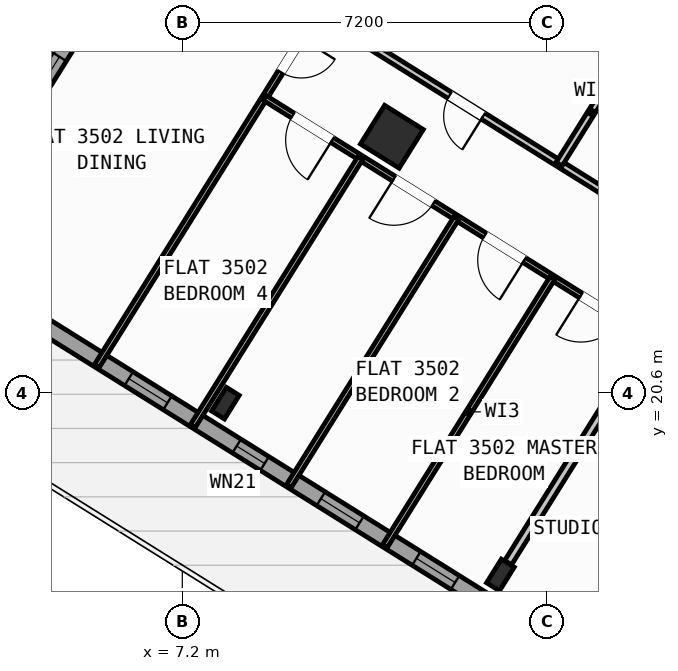
"""IFC4 building model, lengths in metres.
Left out: names, types, materials, properties, quantities, classifications, styles, units other than length and angle.
Written with IfcOpenShell. Run it as: python <this file> out.ifc"""

import sys

from ifc_helpers import new_model, si_unit, direction, frame, frame_2d, origin, origin_2d, place, context, subcontext, project, spatial, rectangle, hollow_rectangle, i_section, extrude, source, transform, mapped, element, fill, save


model = new_model("IFC4")
c1 = context("Model", 3, precision=1e-05, world=origin(), true_north=direction((0.0, 1.0)))
c2 = subcontext(c1, "Body", "Model", "MODEL_VIEW")
j1 = project(units=[si_unit("LENGTHUNIT", "METRE"), si_unit("PLANEANGLEUNIT", "RADIAN")], contexts=[c1])
p1 = place(None, origin())
s1 = spatial("IfcSite", under=j1, at=p1, CompositionType="ELEMENT")
p2 = place(p1, origin())
s2 = spatial("IfcBuilding", under=s1, at=p2, CompositionType="ELEMENT")
p3 = place(p2, frame((0.0, 0.0, 140.7)))
s3 = spatial("IfcBuildingStorey", under=s2, at=p3, CompositionType="ELEMENT", Elevation=140.7)
m1 = source(origin(), c2, "Body", "SweptSolid", [
    extrude(i_section(OverallWidth=0.3, OverallDepth=0.55, WebThickness=0.015, FlangeThickness=0.029, at=origin_2d()), origin(), (0.0, 0.0, 1.0), 3.6),
])
p4 = place(p3, frame((13.478, 17.003, 0.0), z_axis=(0.0, 0.0, 1.0), x_axis=(-0.848048096156, 0.529919264233, 0.0)))
e1 = element("IfcColumn", 1, at=p4, inside=s3, PredefinedType="COLUMN", context=c2, shape_type="MappedRepresentation", body=[
    mapped(m1, transform((0.0, 0.0, 0.0), scale=1.0)),
])
m2 = source(origin(), c2, "Body", "SweptSolid", [
    extrude(hollow_rectangle(XDim=0.9, YDim=0.9, WallThickness=0.036, at=origin_2d()), origin(), (0.0, 0.0, 1.0), 3.6),
])
p5 = place(p3, frame((11.336, 25.653, 0.0), z_axis=(0.0, 0.0, 1.0), x_axis=(-0.848048096156, 0.529919264233, 0.0)))
e2 = element("IfcColumn", 2, at=p5, inside=s3, PredefinedType="COLUMN", context=c2, shape_type="MappedRepresentation", body=[
    mapped(m2, transform((0.0, 0.0, 0.0), scale=1.0)),
])
p6 = place(p3, frame((8.051, 20.395, 0.0), z_axis=(0.0, 0.0, 1.0), x_axis=(-0.848048096156, 0.529919264233, 0.0)))
e3 = element("IfcColumn", 3, at=p6, inside=s3, PredefinedType="COLUMN", context=c2, shape_type="MappedRepresentation", body=[
    mapped(m1, transform((0.0, 0.0, 0.0), scale=1.0)),
])
p7 = place(p3, frame((29.268, 6.429, 0.0), z_axis=(0.0, 0.0, 1.0), x_axis=(-0.848049971435, 0.529916263149, 0.0)))
e4 = element("IfcWall", 4, at=p7, inside=s3, PredefinedType="STANDARD", context=c2, shape_type="SweptSolid", body=[
    extrude(rectangle(XDim=31.588, YDim=0.32, at=frame_2d((15.794, 0.0))), origin(), (0.0, 0.0, 1.0), 3.35),
])
p8 = place(p7, frame((16.362, 0.0, 0.0)))
e5 = element("IfcOpeningElement", 5, at=p8, cuts=e4, PredefinedType="OPENING", context=c2, shape_type="SweptSolid", body=[
    extrude(rectangle(XDim=1.2, YDim=2.15, at=frame_2d((0.6, 1.075))), frame((0.0, 0.17, 0.0), z_axis=(0.0, -1.0, 0.0), x_axis=(1.0, 0.0, 0.0)), (0.0, 0.0, 1.0), 0.34),
])
p9 = place(p7, frame((2.989, 0.0, 0.8)))
e6 = element("IfcOpeningElement", 6, at=p9, cuts=e4, PredefinedType="OPENING", context=c2, shape_type="SweptSolid", body=[
    extrude(rectangle(XDim=2.1, YDim=1.55, at=frame_2d((1.05, 0.775))), frame((0.0, 0.17, 0.0), z_axis=(0.0, -1.0, 0.0), x_axis=(1.0, 0.0, 0.0)), (0.0, 0.0, 1.0), 0.34),
])
p10 = place(p7, frame((8.359, 0.0, 0.8)))
e7 = element("IfcOpeningElement", 7, at=p10, cuts=e4, PredefinedType="OPENING", context=c2, shape_type="SweptSolid", body=[
    extrude(rectangle(XDim=2.1, YDim=1.55, at=frame_2d((1.05, 0.775))), frame((0.0, 0.17, 0.0), z_axis=(0.0, -1.0, 0.0), x_axis=(1.0, 0.0, 0.0)), (0.0, 0.0, 1.0), 0.34),
])
p11 = place(p7, frame((13.284, 0.0, 0.95)))
e8 = element("IfcOpeningElement", 8, at=p11, cuts=e4, PredefinedType="OPENING", context=c2, shape_type="SweptSolid", body=[
    extrude(rectangle(XDim=1.2, YDim=1.4, at=frame_2d((0.6, 0.7))), frame((0.0, 0.17, 0.0), z_axis=(0.0, -1.0, 0.0), x_axis=(1.0, 0.0, 0.0)), (0.0, 0.0, 1.0), 0.34),
])
p12 = place(p7, frame((29.188, 0.0, 0.95)))
e9 = element("IfcOpeningElement", 9, at=p12, cuts=e4, PredefinedType="OPENING", context=c2, shape_type="SweptSolid", body=[
    extrude(rectangle(XDim=1.2, YDim=1.4, at=frame_2d((0.6, 0.7))), frame((0.0, 0.17, 0.0), z_axis=(0.0, -1.0, 0.0), x_axis=(1.0, 0.0, 0.0)), (0.0, 0.0, 1.0), 0.34),
])
p13 = place(p7, frame((19.674, 0.0, 1.0)))
e10 = element("IfcOpeningElement", 10, at=p13, cuts=e4, PredefinedType="OPENING", context=c2, shape_type="SweptSolid", body=[
    extrude(rectangle(XDim=0.9, YDim=1.25, at=frame_2d((0.45, 0.625))), frame((0.0, 0.17, 0.0), z_axis=(0.0, -1.0, 0.0), x_axis=(1.0, 0.0, 0.0)), (0.0, 0.0, 1.0), 0.34),
])
p14 = place(p7, frame((21.896, 0.0, 1.0)))
e11 = element("IfcOpeningElement", 11, at=p14, cuts=e4, PredefinedType="OPENING", context=c2, shape_type="SweptSolid", body=[
    extrude(rectangle(XDim=0.9, YDim=1.25, at=frame_2d((0.45, 0.625))), frame((0.0, 0.17, 0.0), z_axis=(0.0, -1.0, 0.0), x_axis=(1.0, 0.0, 0.0)), (0.0, 0.0, 1.0), 0.34),
])
p15 = place(p7, frame((24.106, 0.0, 1.0)))
e12 = element("IfcOpeningElement", 12, at=p15, cuts=e4, PredefinedType="OPENING", context=c2, shape_type="SweptSolid", body=[
    extrude(rectangle(XDim=0.65, YDim=1.15, at=frame_2d((0.325, 0.575))), frame((0.0, 0.17, 0.0), z_axis=(0.0, -1.0, 0.0), x_axis=(1.0, 0.0, 0.0)), (0.0, 0.0, 1.0), 0.34),
])
p16 = place(p7, frame((26.366, 0.0, 1.0)))
e13 = element("IfcOpeningElement", 13, at=p16, cuts=e4, PredefinedType="OPENING", context=c2, shape_type="SweptSolid", body=[
    extrude(rectangle(XDim=0.9, YDim=1.25, at=frame_2d((0.45, 0.625))), frame((0.0, 0.17, 0.0), z_axis=(0.0, -1.0, 0.0), x_axis=(1.0, 0.0, 0.0)), (0.0, 0.0, 1.0), 0.34),
])
p17 = place(p3, frame((2.415, 23.452, 0.0), z_axis=(0.0, 0.0, 1.0), x_axis=(0.52991049553, 0.848053575387, 0.0)))
e14 = element("IfcWall", 14, at=p17, inside=s3, PredefinedType="STANDARD", context=c2, shape_type="SweptSolid", body=[
    extrude(rectangle(XDim=21.587, YDim=0.32, at=frame_2d((10.794, 0.0))), origin(), (0.0, 0.0, 1.0), 2.775),
])
p18 = place(p17, frame((2.356, 0.0, 0.8)))
e15 = element("IfcOpeningElement", 15, at=p18, cuts=e14, PredefinedType="OPENING", context=c2, shape_type="SweptSolid", body=[
    extrude(rectangle(XDim=2.1, YDim=1.55, at=frame_2d((1.05, 0.775))), frame((0.0, 0.17, 0.0), z_axis=(0.0, -1.0, 0.0), x_axis=(1.0, 0.0, 0.0)), (0.0, 0.0, 1.0), 0.34),
])
p19 = place(p17, frame((8.639, 0.0, 1.0)))
e16 = element("IfcOpeningElement", 16, at=p19, cuts=e14, PredefinedType="OPENING", context=c2, shape_type="SweptSolid", body=[
    extrude(rectangle(XDim=0.9, YDim=1.25, at=frame_2d((0.45, 0.625))), frame((0.0, 0.17, 0.0), z_axis=(0.0, -1.0, 0.0), x_axis=(1.0, 0.0, 0.0)), (0.0, 0.0, 1.0), 0.34),
])
p20 = place(p17, frame((17.744, 0.0, 0.85)))
e17 = element("IfcOpeningElement", 17, at=p20, cuts=e14, PredefinedType="OPENING", context=c2, shape_type="SweptSolid", body=[
    extrude(rectangle(XDim=1.5, YDim=1.5, at=frame_2d((0.75, 0.75))), frame((0.0, 0.17, 0.0), z_axis=(0.0, -1.0, 0.0), x_axis=(1.0, 0.0, 0.0)), (0.0, 0.0, 1.0), 0.34),
])
p21 = place(p3, frame((14.138, 41.825, 0.0), z_axis=(0.0, 0.0, 1.0), x_axis=(0.848046498049, -0.529921821731, 0.0)))
e18 = element("IfcWall", 18, at=p21, inside=s3, PredefinedType="STANDARD", context=c2, shape_type="SweptSolid", body=[
    extrude(rectangle(XDim=31.588, YDim=0.32, at=frame_2d((15.794, 0.0))), origin(), (0.0, 0.0, 1.0), 3.35),
])
p22 = place(p21, frame((2.949, 0.0, 0.0)))
e19 = element("IfcOpeningElement", 19, at=p22, cuts=e18, PredefinedType="OPENING", context=c2, shape_type="SweptSolid", body=[
    extrude(rectangle(XDim=1.05, YDim=2.15, at=frame_2d((0.525, 1.075))), frame((0.0, 0.17, 0.0), z_axis=(0.0, -1.0, 0.0), x_axis=(1.0, 0.0, 0.0)), (0.0, 0.0, 1.0), 0.34),
])
p23 = place(p21, frame((0.861, 0.0, 0.85)))
e20 = element("IfcOpeningElement", 20, at=p23, cuts=e18, PredefinedType="OPENING", context=c2, shape_type="SweptSolid", body=[
    extrude(rectangle(XDim=1.5, YDim=1.5, at=frame_2d((0.75, 0.75))), frame((0.0, 0.17, 0.0), z_axis=(0.0, -1.0, 0.0), x_axis=(1.0, 0.0, 0.0)), (0.0, 0.0, 1.0), 0.34),
])
p24 = place(p21, frame((8.494, 0.0, 0.85)))
e21 = element("IfcOpeningElement", 21, at=p24, cuts=e18, PredefinedType="OPENING", context=c2, shape_type="SweptSolid", body=[
    extrude(rectangle(XDim=1.8, YDim=1.5, at=frame_2d((0.9, 0.75))), frame((0.0, 0.17, 0.0), z_axis=(0.0, -1.0, 0.0), x_axis=(1.0, 0.0, 0.0)), (0.0, 0.0, 1.0), 0.34),
])
p25 = place(p21, frame((13.874, 0.0, 0.85)))
e22 = element("IfcOpeningElement", 22, at=p25, cuts=e18, PredefinedType="OPENING", context=c2, shape_type="SweptSolid", body=[
    extrude(rectangle(XDim=1.5, YDim=1.5, at=frame_2d((0.75, 0.75))), frame((0.0, 0.17, 0.0), z_axis=(0.0, -1.0, 0.0), x_axis=(1.0, 0.0, 0.0)), (0.0, 0.0, 1.0), 0.34),
])
p26 = place(p21, frame((17.104, 0.0, 1.0)))
e23 = element("IfcOpeningElement", 23, at=p26, cuts=e18, PredefinedType="OPENING", context=c2, shape_type="SweptSolid", body=[
    extrude(rectangle(XDim=0.9, YDim=1.25, at=frame_2d((0.45, 0.625))), frame((0.0, 0.17, 0.0), z_axis=(0.0, -1.0, 0.0), x_axis=(1.0, 0.0, 0.0)), (0.0, 0.0, 1.0), 0.34),
])
p27 = place(p21, frame((22.144, 0.0, 1.0)))
e24 = element("IfcOpeningElement", 24, at=p27, cuts=e18, PredefinedType="OPENING", context=c2, shape_type="SweptSolid", body=[
    extrude(rectangle(XDim=0.9, YDim=1.25, at=frame_2d((0.45, 0.625))), frame((0.0, 0.17, 0.0), z_axis=(0.0, -1.0, 0.0), x_axis=(1.0, 0.0, 0.0)), (0.0, 0.0, 1.0), 0.34),
])
p28 = place(p21, frame((27.744, 0.0, 1.0)))
e25 = element("IfcOpeningElement", 25, at=p28, cuts=e18, PredefinedType="OPENING", context=c2, shape_type="SweptSolid", body=[
    extrude(rectangle(XDim=0.9, YDim=1.25, at=frame_2d((0.45, 0.625))), frame((0.0, 0.17, 0.0), z_axis=(0.0, -1.0, 0.0), x_axis=(1.0, 0.0, 0.0)), (0.0, 0.0, 1.0), 0.34),
])
p29 = place(p3, frame((23.104, 25.256, 0.0), z_axis=(0.0, 0.0, 1.0), x_axis=(-0.848041752158, 0.529929416617, 0.0)))
e26 = element("IfcWall", 26, at=p29, inside=s3, PredefinedType="PARTITIONING", context=c2, shape_type="SweptSolid", body=[
    extrude(rectangle(XDim=16.73, YDim=0.16, at=frame_2d((8.365, 0.0))), origin(), (0.0, 0.0, 1.0), 3.34),
])
p30 = place(p29, frame((2.22, 0.0, 0.0)))
e27 = element("IfcOpeningElement", 27, at=p30, cuts=e26, PredefinedType="OPENING", context=c2, shape_type="SweptSolid", body=[
    extrude(rectangle(XDim=0.86, YDim=2.05, at=frame_2d((0.43, 1.025))), frame((0.0, 0.09, 0.0), z_axis=(0.0, -1.0, 0.0), x_axis=(1.0, 0.0, 0.0)), (0.0, 0.0, 1.0), 0.18),
])
p31 = place(p29, frame((12.084, 0.0, 0.0)))
e28 = element("IfcOpeningElement", 28, at=p31, cuts=e26, PredefinedType="OPENING", context=c2, shape_type="SweptSolid", body=[
    extrude(rectangle(XDim=1.0, YDim=2.1, at=frame_2d((0.5, 1.05))), frame((0.0, 0.09, 0.0), z_axis=(0.0, -1.0, 0.0), x_axis=(1.0, 0.0, 0.0)), (0.0, 0.0, 1.0), 0.18),
])
p32 = place(p3, frame((21.938, 23.391, 0.0), z_axis=(0.0, 0.0, 1.0), x_axis=(-0.848045850158, 0.529922858565, 0.0)))
e29 = element("IfcWall", 29, at=p32, inside=s3, PredefinedType="PARTITIONING", context=c2, shape_type="SweptSolid", body=[
    extrude(rectangle(XDim=16.73, YDim=0.16, at=frame_2d((8.365, 0.0))), origin(), (0.0, 0.0, 1.0), 3.34),
])
p33 = place(p32, frame((2.22, 0.0, 0.0)))
e30 = element("IfcOpeningElement", 30, at=p33, cuts=e29, PredefinedType="OPENING", context=c2, shape_type="SweptSolid", body=[
    extrude(rectangle(XDim=0.86, YDim=2.05, at=frame_2d((0.43, 1.025))), frame((0.0, 0.09, 0.0), z_axis=(0.0, -1.0, 0.0), x_axis=(1.0, 0.0, 0.0)), (0.0, 0.0, 1.0), 0.18),
])
p34 = place(p32, frame((14.22, 0.0, 0.0)))
e31 = element("IfcOpeningElement", 31, at=p34, cuts=e29, PredefinedType="OPENING", context=c2, shape_type="SweptSolid", body=[
    extrude(rectangle(XDim=1.0, YDim=2.1, at=frame_2d((0.5, 1.05))), frame((0.0, 0.09, 0.0), z_axis=(0.0, -1.0, 0.0), x_axis=(1.0, 0.0, 0.0)), (0.0, 0.0, 1.0), 0.18),
])
p35 = place(p3, frame((16.519, 21.87, 0.0), z_axis=(0.0, 0.0, 1.0), x_axis=(-0.529922447305, -0.848046107144, 0.0)))
e32 = element("IfcWall", 32, at=p35, inside=s3, PredefinedType="PARTITIONING", context=c2, shape_type="SweptSolid", body=[
    extrude(rectangle(XDim=5.451, YDim=0.16, at=frame_2d((2.726, 0.0))), origin(), (0.0, 0.0, 1.0), 2.775),
])
p36 = place(p3, frame((11.143, 30.136, 0.0), z_axis=(0.0, 0.0, 1.0), x_axis=(-0.529922479612, -0.848046086956, 0.0)))
e33 = element("IfcWall", 33, at=p36, inside=s3, PredefinedType="PARTITIONING", context=c2, shape_type="SweptSolid", body=[
    extrude(rectangle(XDim=10.62, YDim=0.11, at=frame_2d((5.31, 0.0))), origin(), (0.0, 0.0, 1.0), 3.34),
])
p37 = place(p36, frame((3.0, 0.0, 0.0)))
e34 = element("IfcOpeningElement", 34, at=p37, cuts=e33, PredefinedType="OPENING", context=c2, shape_type="SweptSolid", body=[
    extrude(rectangle(XDim=0.78, YDim=2.05, at=frame_2d((0.39, 1.025))), frame((0.0, 0.065, 0.0), z_axis=(0.0, -1.0, 0.0), x_axis=(1.0, 0.0, 0.0)), (0.0, 0.0, 1.0), 0.13),
])
p38 = place(p3, frame((17.452, 23.364, 0.0), z_axis=(0.0, 0.0, 1.0), x_axis=(-0.848044326704, 0.52992529657, 0.0)))
e35 = element("IfcWall", 35, at=p38, inside=s3, PredefinedType="PLUMBINGWALL", context=c2, shape_type="SweptSolid", body=[
    extrude(rectangle(XDim=8.94, YDim=0.14, at=frame_2d((4.47, 0.0))), origin(), (0.0, 0.0, 1.0), 3.34),
])
p39 = place(p38, frame((5.087, 0.0, 0.0)))
e36 = element("IfcOpeningElement", 36, at=p39, cuts=e35, PredefinedType="OPENING", context=c2, shape_type="SweptSolid", body=[
    extrude(rectangle(XDim=0.78, YDim=2.05, at=frame_2d((0.39, 1.025))), frame((0.0, 0.08, 0.0), z_axis=(0.0, -1.0, 0.0), x_axis=(1.0, 0.0, 0.0)), (0.0, 0.0, 1.0), 0.16),
])
p40 = place(p38, frame((1.218, 0.0, 0.0)))
e37 = element("IfcOpeningElement", 37, at=p40, cuts=e35, PredefinedType="OPENING", context=c2, shape_type="SweptSolid", body=[
    extrude(rectangle(XDim=0.78, YDim=2.05, at=frame_2d((0.39, 1.025))), frame((0.0, 0.08, 0.0), z_axis=(0.0, -1.0, 0.0), x_axis=(1.0, 0.0, 0.0)), (0.0, 0.0, 1.0), 0.16),
])
p41 = place(p3, frame((15.913, 27.156, 0.0), z_axis=(0.0, 0.0, 1.0), x_axis=(-0.529935194983, -0.848038141311, 0.0)))
e38 = element("IfcWall", 38, at=p41, inside=s3, PredefinedType="PLUMBINGWALL", context=c2, shape_type="SweptSolid", body=[
    extrude(rectangle(XDim=2.41, YDim=0.14, at=frame_2d((1.205, 0.0))), origin(), (0.0, 0.0, 1.0), 3.34),
])
p42 = place(p3, frame((16.403, 21.685, 0.0), z_axis=(0.0, 0.0, 1.0), x_axis=(-0.848044326704, 0.52992529657, 0.0)))
e39 = element("IfcWall", 39, at=p42, inside=s3, PredefinedType="PARTITIONING", context=c2, shape_type="SweptSolid", body=[
    extrude(rectangle(XDim=8.94, YDim=0.11, at=frame_2d((4.47, 0.0))), origin(), (0.0, 0.0, 1.0), 3.34),
])
p43 = place(p42, frame((0.657, 0.0, 0.0)))
e40 = element("IfcOpeningElement", 40, at=p43, cuts=e39, PredefinedType="OPENING", context=c2, shape_type="SweptSolid", body=[
    extrude(rectangle(XDim=0.92, YDim=2.08, at=frame_2d((0.46, 1.04))), frame((0.0, 0.065, 0.0), z_axis=(0.0, -1.0, 0.0), x_axis=(1.0, 0.0, 0.0)), (0.0, 0.0, 1.0), 0.13),
])
p44 = place(p42, frame((2.893, 0.0, 0.0)))
e41 = element("IfcOpeningElement", 41, at=p44, cuts=e39, PredefinedType="OPENING", context=c2, shape_type="SweptSolid", body=[
    extrude(rectangle(XDim=0.92, YDim=2.08, at=frame_2d((0.46, 1.04))), frame((0.0, 0.065, 0.0), z_axis=(0.0, -1.0, 0.0), x_axis=(1.0, 0.0, 0.0)), (0.0, 0.0, 1.0), 0.13),
])
p45 = place(p42, frame((5.008, 0.0, 0.0)))
e42 = element("IfcOpeningElement", 42, at=p45, cuts=e39, PredefinedType="OPENING", context=c2, shape_type="SweptSolid", body=[
    extrude(rectangle(XDim=0.92, YDim=2.08, at=frame_2d((0.46, 1.04))), frame((0.0, 0.065, 0.0), z_axis=(0.0, -1.0, 0.0), x_axis=(1.0, 0.0, 0.0)), (0.0, 0.0, 1.0), 0.13),
])
p46 = place(p42, frame((7.363, 0.0, 0.0)))
e43 = element("IfcOpeningElement", 43, at=p46, cuts=e39, PredefinedType="OPENING", context=c2, shape_type="SweptSolid", body=[
    extrude(rectangle(XDim=0.92, YDim=2.08, at=frame_2d((0.46, 1.04))), frame((0.0, 0.065, 0.0), z_axis=(0.0, -1.0, 0.0), x_axis=(1.0, 0.0, 0.0)), (0.0, 0.0, 1.0), 0.13),
])
for number, where, z_axis, x_axis in (
    (44, (14.508, 22.869, 0.0), (0.0, 0.0, 1.0), (-0.53, -0.848, 0.0)),
    (45, (12.613, 24.053, 0.0), (0.0, 0.0, 1.0), (-0.53, -0.848, 0.0)),
):
    element("IfcWall", number, at=place(p3, frame(where, z_axis=z_axis, x_axis=x_axis)), inside=s3, PredefinedType="PARTITIONING", context=c2, shape_type="SweptSolid", body=[
        extrude(rectangle(XDim=6.24, YDim=0.11, at=frame_2d((3.12, 0.0))), origin(), (0.0, 0.0, 1.0), 2.995),
    ])
p47 = place(p3, frame((10.717, 25.238, 0.0), z_axis=(0.0, 0.0, 1.0), x_axis=(-0.52991804857, -0.848048855786, 0.0)))
e46 = element("IfcWall", 46, at=p47, inside=s3, PredefinedType="PARTITIONING", context=c2, shape_type="SweptSolid", body=[
    extrude(rectangle(XDim=6.24, YDim=0.11, at=frame_2d((3.12, 0.0))), origin(), (0.0, 0.0, 1.0), 3.34),
])
m3 = source(origin(), c2, "Body", "SweptSolid", [
    extrude(rectangle(XDim=2.1, YDim=1.55, at=frame_2d((1.05, 0.775))), frame((0.0, 0.03, 0.0), z_axis=(0.0, -1.0, 0.0), x_axis=(1.0, 0.0, 0.0)), (0.0, 0.0, 1.0), 0.06),
])
p48 = place(p18, origin())
e47 = element("IfcWindow", 47, at=p48, inside=s3, PartitioningType="SINGLE_PANEL", PredefinedType="WINDOW", context=c2, shape_type="MappedRepresentation", body=[
    mapped(m3, transform((0.0, 0.0, 0.0), scale=1.0)),
])
fill(e15, e47)
m4 = source(origin(), c2, "Body", "SweptSolid", [
    extrude(rectangle(XDim=0.9, YDim=1.25, at=frame_2d((0.45, 0.625))), frame((0.0, 0.03, 0.0), z_axis=(0.0, -1.0, 0.0), x_axis=(1.0, 0.0, 0.0)), (0.0, 0.0, 1.0), 0.06),
])
p49 = place(p13, origin())
e48 = element("IfcWindow", 48, at=p49, inside=s3, PartitioningType="SINGLE_PANEL", PredefinedType="WINDOW", context=c2, shape_type="MappedRepresentation", body=[
    mapped(m4, transform((0.0, 0.0, 0.0), scale=1.0)),
])
fill(e10, e48)
p50 = place(p14, origin())
e49 = element("IfcWindow", 49, at=p50, inside=s3, PartitioningType="SINGLE_PANEL", PredefinedType="WINDOW", context=c2, shape_type="MappedRepresentation", body=[
    mapped(m4, transform((0.0, 0.0, 0.0), scale=1.0)),
])
fill(e11, e49)
m5 = source(origin(), c2, "Body", "SweptSolid", [
    extrude(rectangle(XDim=0.65, YDim=1.15, at=frame_2d((0.325, 0.575))), frame((0.0, 0.03, 0.0), z_axis=(0.0, -1.0, 0.0), x_axis=(1.0, 0.0, 0.0)), (0.0, 0.0, 1.0), 0.06),
])
p51 = place(p15, origin())
e50 = element("IfcWindow", 50, at=p51, inside=s3, PartitioningType="SINGLE_PANEL", PredefinedType="WINDOW", context=c2, shape_type="MappedRepresentation", body=[
    mapped(m5, transform((0.0, 0.0, 0.0), scale=1.0)),
])
fill(e12, e50)
p52 = place(p16, origin())
e51 = element("IfcWindow", 51, at=p52, inside=s3, PartitioningType="SINGLE_PANEL", PredefinedType="WINDOW", context=c2, shape_type="MappedRepresentation", body=[
    mapped(m4, transform((0.0, 0.0, 0.0), scale=1.0)),
])
fill(e13, e51)
m6 = source(origin(), c2, "Body", "SweptSolid", [
    extrude(rectangle(XDim=0.78, YDim=2.05, at=frame_2d((0.39, 1.025))), frame((0.0, 0.025, 0.0), z_axis=(0.0, -1.0, 0.0), x_axis=(1.0, 0.0, 0.0)), (0.0, 0.0, 1.0), 0.05),
])
p53 = place(p37, origin())
e52 = element("IfcDoor", 52, at=p53, inside=s3, OperationType="SINGLE_SWING_LEFT", PredefinedType="DOOR", context=c2, shape_type="MappedRepresentation", body=[
    mapped(m6, transform((0.0, 0.0, 0.0), scale=1.0)),
])
fill(e34, e52)
p54 = place(p39, origin())
e53 = element("IfcDoor", 53, at=p54, inside=s3, OperationType="SINGLE_SWING_LEFT", PredefinedType="DOOR", context=c2, shape_type="MappedRepresentation", body=[
    mapped(m6, transform((0.0, 0.0, 0.0), scale=1.0)),
])
fill(e36, e53)
m7 = source(origin(), c2, "Body", "SweptSolid", [
    extrude(rectangle(XDim=0.92, YDim=2.08, at=frame_2d((0.46, 1.04))), frame((0.0, 0.025, 0.0), z_axis=(0.0, -1.0, 0.0), x_axis=(1.0, 0.0, 0.0)), (0.0, 0.0, 1.0), 0.05),
])
p55 = place(p43, origin())
e54 = element("IfcDoor", 54, at=p55, inside=s3, OperationType="SINGLE_SWING_RIGHT", PredefinedType="DOOR", context=c2, shape_type="MappedRepresentation", body=[
    mapped(m7, transform((0.0, 0.0, 0.0), scale=1.0)),
])
fill(e40, e54)
p56 = place(p44, origin())
e55 = element("IfcDoor", 55, at=p56, inside=s3, OperationType="SINGLE_SWING_LEFT", PredefinedType="DOOR", context=c2, shape_type="MappedRepresentation", body=[
    mapped(m7, transform((0.0, 0.0, 0.0), scale=1.0)),
])
fill(e41, e55)
p57 = place(p45, origin())
e56 = element("IfcDoor", 56, at=p57, inside=s3, OperationType="SINGLE_SWING_RIGHT", PredefinedType="DOOR", context=c2, shape_type="MappedRepresentation", body=[
    mapped(m7, transform((0.0, 0.0, 0.0), scale=1.0)),
])
fill(e42, e56)
p58 = place(p46, origin())
e57 = element("IfcDoor", 57, at=p58, inside=s3, OperationType="SINGLE_SWING_LEFT", PredefinedType="DOOR", context=c2, shape_type="MappedRepresentation", body=[
    mapped(m7, transform((0.0, 0.0, 0.0), scale=1.0)),
])
fill(e43, e57)
save(model, sys.argv[1])
